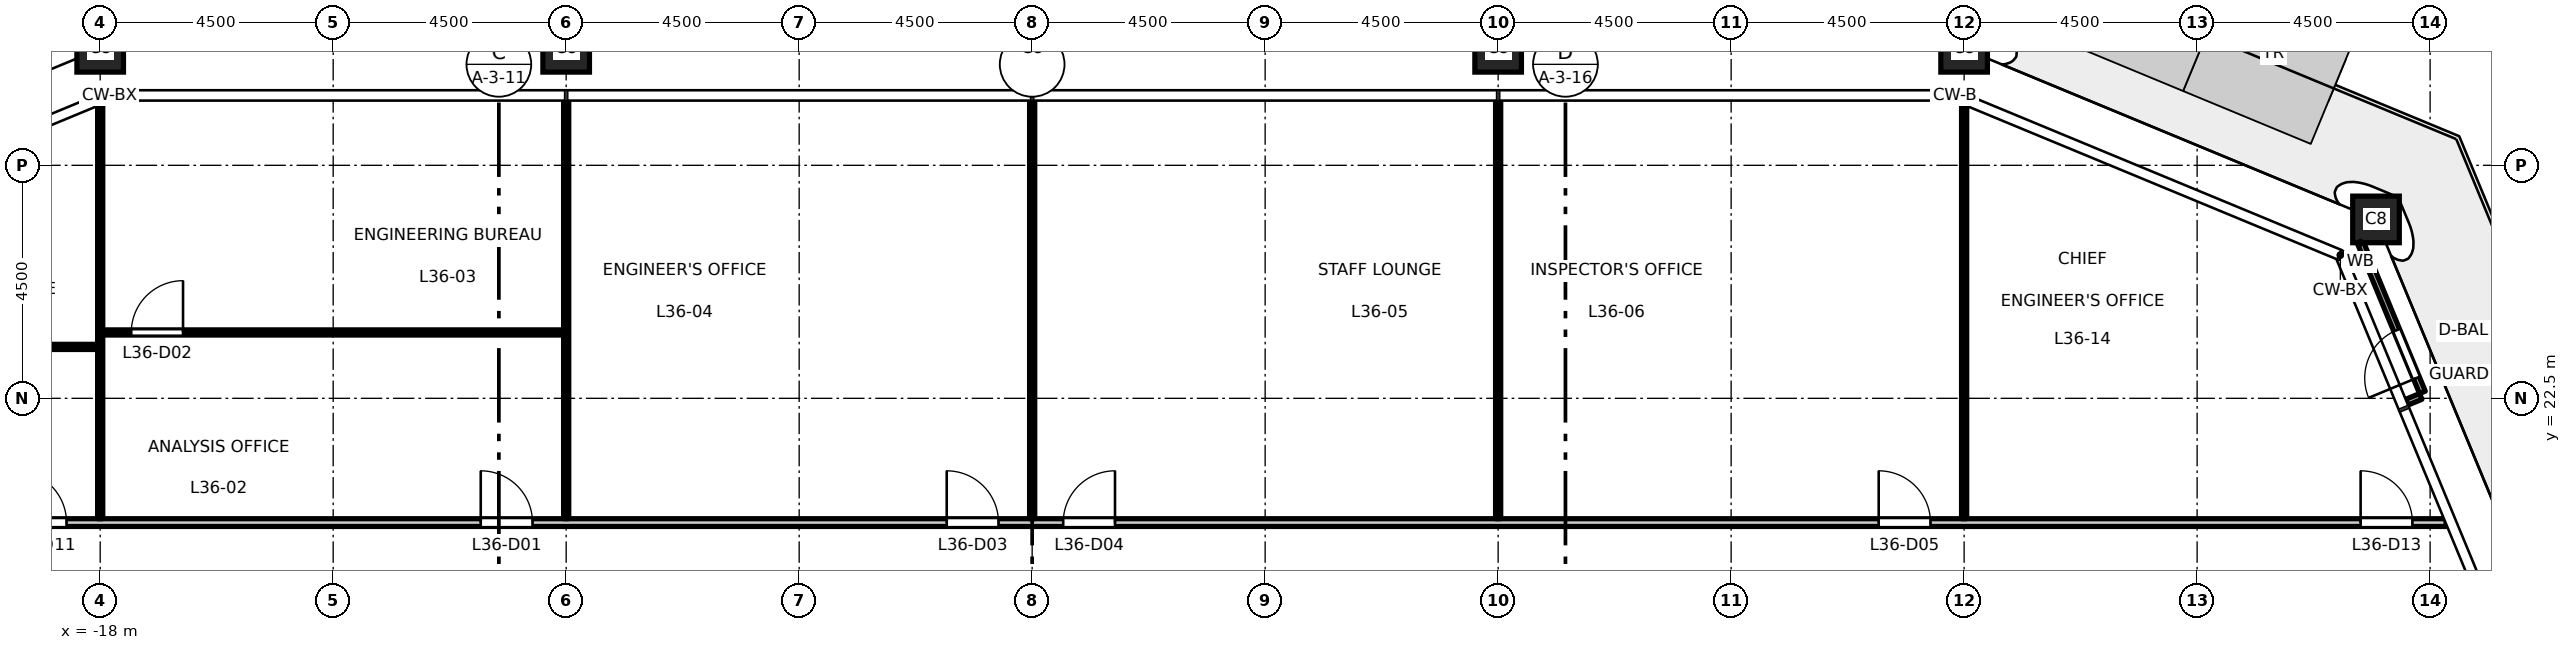
"""IFC4 building model, lengths in metres.
Left out: names, types, materials, properties, quantities, classifications, styles, units other than length and angle.
Written with IfcOpenShell. Run it as: python <this file> out.ifc"""

import sys

from ifc_helpers import new_model, si_unit, direction, frame, frame_2d, origin, origin_2d, place, context, subcontext, project, spatial, rectangle, hollow_rectangle, extrude, element, fill, save


model = new_model("IFC4")
c1 = context("Model", 3, precision=1e-05, world=origin(), true_north=direction((0.0, 1.0)))
c2 = subcontext(c1, "Body", "Model", "MODEL_VIEW")
j1 = project(units=[si_unit("LENGTHUNIT", "METRE"), si_unit("PLANEANGLEUNIT", "RADIAN")], contexts=[c1])
p1 = place(None, origin())
s1 = spatial("IfcSite", under=j1, at=p1, CompositionType="ELEMENT")
p2 = place(p1, origin())
s2 = spatial("IfcBuilding", under=s1, at=p2, CompositionType="ELEMENT")
p3 = place(p2, frame((0.0, 0.0, 167.7)))
s3 = spatial("IfcBuildingStorey", under=s2, at=p3, CompositionType="ELEMENT", Elevation=167.7)
for number, where, z_axis, x_axis in (
    (1, (25.955, 25.955, 0.0), (0.0, 0.0, 1.0), (1.0, 0.0, 0.0)),
    (2, (18.0, 29.25, 0.0), (0.0, 0.0, 1.0), (1.0, 0.0, 0.0)),
    (3, (9.0, 29.25, 0.0), (0.0, 0.0, 1.0), (1.0, 0.0, 0.0)),
    (4, (0.0, 29.25, 0.0), (0.0, 0.0, 1.0), (1.0, 0.0, 0.0)),
    (5, (-9.0, 29.25, 0.0), (0.0, 0.0, 1.0), (1.0, 0.0, 0.0)),
    (6, (-18.0, 29.25, 0.0), (0.0, 0.0, 1.0), (1.0, 0.0, 0.0)),
):
    element("IfcColumn", number, at=place(p3, frame(where, z_axis=z_axis, x_axis=x_axis)), inside=s3, PredefinedType="COLUMN", context=c2, shape_type="SweptSolid", body=[
        extrude(hollow_rectangle(XDim=0.9, YDim=0.9, WallThickness=0.05, at=origin_2d()), origin(), (0.0, 0.0, 1.0), 4.5),
    ])
for number, where, z_axis, x_axis in (
    (7, (26.551, 22.425, 0.0), (0.0, 0.0, 1.0), (0.924, 0.382, 0.0)),
    (8, (25.421, 25.153, 0.0), (0.0, 0.0, 1.0), (0.924, 0.383, 0.0)),
):
    element("IfcWall", number, at=place(p3, frame(where, z_axis=z_axis, x_axis=x_axis)), inside=s3, PredefinedType="STANDARD", context=c2, shape_type="SweptSolid", body=[
        extrude(rectangle(XDim=0.29, YDim=0.12, at=frame_2d((0.145, 0.0))), origin(), (0.0, 0.0, 1.0), 4.35),
    ])
p4 = place(p3, frame((26.852, 22.615, 0.0), z_axis=(0.0, 0.0, 1.0), x_axis=(-0.382691800707, 0.923876066186, 0.0)))
e9 = element("IfcWall", 9, at=p4, inside=s3, PredefinedType="STANDARD", context=c2, shape_type="SweptSolid", body=[
    extrude(rectangle(XDim=3.128, YDim=0.12, at=frame_2d((1.564, 0.0))), origin(), (0.0, 0.0, 1.0), 4.35),
])
p5 = place(p4, frame((0.3, 0.0, 0.0)))
e10 = element("IfcOpeningElement", 10, at=p5, cuts=e9, PredefinedType="OPENING", context=c2, shape_type="SweptSolid", body=[
    extrude(rectangle(XDim=1.0, YDim=2.4, at=frame_2d((0.5, 1.2))), frame((0.0, 0.07, 0.0), z_axis=(0.0, -1.0, 0.0), x_axis=(1.0, 0.0, 0.0)), (0.0, 0.0, 1.0), 0.14),
])
p6 = place(p3, frame((-27.308, 20.1, 0.0), z_axis=(0.0, 0.0, 1.0), x_axis=(1.0, 0.0, 0.0)))
e11 = element("IfcWall", 11, at=p6, inside=s3, PredefinedType="PARTITIONING", context=c2, shape_type="SweptSolid", body=[
    extrude(rectangle(XDim=54.616, YDim=0.15, at=frame_2d((27.308, 0.0))), origin(), (0.0, 0.0, 1.0), 4.35),
])
p7 = place(p6, frame((16.658, 0.0, 0.0)))
e12 = element("IfcOpeningElement", 12, at=p7, cuts=e11, PredefinedType="OPENING", context=c2, shape_type="SweptSolid", body=[
    extrude(rectangle(XDim=1.0, YDim=2.1, at=frame_2d((0.5, 1.05))), frame((0.0, 0.085, 0.0), z_axis=(0.0, -1.0, 0.0), x_axis=(1.0, 0.0, 0.0)), (0.0, 0.0, 1.0), 0.17),
])
p8 = place(p6, frame((25.658, 0.0, 0.0)))
e13 = element("IfcOpeningElement", 13, at=p8, cuts=e11, PredefinedType="OPENING", context=c2, shape_type="SweptSolid", body=[
    extrude(rectangle(XDim=1.0, YDim=2.1, at=frame_2d((0.5, 1.05))), frame((0.0, 0.085, 0.0), z_axis=(0.0, -1.0, 0.0), x_axis=(1.0, 0.0, 0.0)), (0.0, 0.0, 1.0), 0.17),
])
p9 = place(p6, frame((27.908, 0.0, 0.0)))
e14 = element("IfcOpeningElement", 14, at=p9, cuts=e11, PredefinedType="OPENING", context=c2, shape_type="SweptSolid", body=[
    extrude(rectangle(XDim=1.0, YDim=2.1, at=frame_2d((0.5, 1.05))), frame((0.0, 0.085, 0.0), z_axis=(0.0, -1.0, 0.0), x_axis=(1.0, 0.0, 0.0)), (0.0, 0.0, 1.0), 0.17),
])
p10 = place(p6, frame((43.658, 0.0, 0.0)))
e15 = element("IfcOpeningElement", 15, at=p10, cuts=e11, PredefinedType="OPENING", context=c2, shape_type="SweptSolid", body=[
    extrude(rectangle(XDim=1.0, YDim=2.1, at=frame_2d((0.5, 1.05))), frame((0.0, 0.085, 0.0), z_axis=(0.0, -1.0, 0.0), x_axis=(1.0, 0.0, 0.0)), (0.0, 0.0, 1.0), 0.17),
])
p11 = place(p6, frame((7.658, 0.0, 0.0)))
e16 = element("IfcOpeningElement", 16, at=p11, cuts=e11, PredefinedType="OPENING", context=c2, shape_type="SweptSolid", body=[
    extrude(rectangle(XDim=1.0, YDim=2.1, at=frame_2d((0.5, 1.05))), frame((0.0, 0.085, 0.0), z_axis=(0.0, -1.0, 0.0), x_axis=(1.0, 0.0, 0.0)), (0.0, 0.0, 1.0), 0.17),
])
p12 = place(p6, frame((52.966, 0.0, 0.0)))
e17 = element("IfcOpeningElement", 17, at=p12, cuts=e11, PredefinedType="OPENING", context=c2, shape_type="SweptSolid", body=[
    extrude(rectangle(XDim=1.0, YDim=2.1, at=frame_2d((0.5, 1.05))), frame((0.0, 0.085, 0.0), z_axis=(0.0, -1.0, 0.0), x_axis=(1.0, 0.0, 0.0)), (0.0, 0.0, 1.0), 0.17),
])
p13 = place(p3, frame((-25.903, 23.493, 0.0), z_axis=(0.0, 0.0, 1.0), x_axis=(1.0, 0.0, 0.0)))
e18 = element("IfcWall", 18, at=p13, inside=s3, PredefinedType="PARTITIONING", context=c2, shape_type="SweptSolid", body=[
    extrude(rectangle(XDim=7.853, YDim=0.1, at=frame_2d((3.927, 0.0))), origin(), (0.0, 0.0, 1.0), 4.35),
])
p14 = place(p13, frame((0.753, 0.0, 0.0)))
e19 = element("IfcOpeningElement", 19, at=p14, cuts=e18, PredefinedType="OPENING", context=c2, shape_type="SweptSolid", body=[
    extrude(rectangle(XDim=1.0, YDim=2.1, at=frame_2d((0.5, 1.05))), frame((0.0, 0.06, 0.0), z_axis=(0.0, -1.0, 0.0), x_axis=(1.0, 0.0, 0.0)), (0.0, 0.0, 1.0), 0.12),
])
p15 = place(p3, frame((-17.95, 23.772, 0.0), z_axis=(0.0, 0.0, 1.0), x_axis=(1.0, 0.0, 0.0)))
e20 = element("IfcWall", 20, at=p15, inside=s3, PredefinedType="PARTITIONING", context=c2, shape_type="SweptSolid", body=[
    extrude(rectangle(XDim=8.9, YDim=0.1, at=frame_2d((4.45, 0.0))), origin(), (0.0, 0.0, 1.0), 4.35),
])
p16 = place(p15, frame((0.55, 0.0, 0.0)))
e21 = element("IfcOpeningElement", 21, at=p16, cuts=e20, PredefinedType="OPENING", context=c2, shape_type="SweptSolid", body=[
    extrude(rectangle(XDim=1.0, YDim=2.1, at=frame_2d((0.5, 1.05))), frame((0.0, 0.06, 0.0), z_axis=(0.0, -1.0, 0.0), x_axis=(1.0, 0.0, 0.0)), (0.0, 0.0, 1.0), 0.12),
])
p17 = place(p3, frame((-18.0, 20.175, 0.0), z_axis=(0.0, 0.0, 1.0), x_axis=(0.0, 1.0, 0.0)))
e22 = element("IfcWall", 22, at=p17, inside=s3, PredefinedType="PARTITIONING", context=c2, shape_type="SweptSolid", body=[
    extrude(rectangle(XDim=8.003, YDim=0.1, at=frame_2d((4.001, 0.0))), origin(), (0.0, 0.0, 1.0), 3.45),
])
for number, where, z_axis, x_axis in (
    (23, (-9.0, 20.175, 0.0), (0.0, 0.0, 1.0), (0.0, 1.0, 0.0)),
    (24, (0.0, 20.175, 0.0), (0.0, 0.0, 1.0), (0.0, 1.0, 0.0)),
    (25, (9.0, 20.175, 0.0), (0.0, 0.0, 1.0), (0.0, 1.0, 0.0)),
):
    element("IfcWall", number, at=place(p3, frame(where, z_axis=z_axis, x_axis=x_axis)), inside=s3, PredefinedType="PARTITIONING", context=c2, shape_type="SweptSolid", body=[
        extrude(rectangle(XDim=8.085, YDim=0.1, at=frame_2d((4.042, 0.0))), origin(), (0.0, 0.0, 1.0), 3.45),
    ])
p18 = place(p3, frame((18.0, 20.175, 0.0), z_axis=(0.0, 0.0, 1.0), x_axis=(0.0, 1.0, 0.0)))
e26 = element("IfcWall", 26, at=p18, inside=s3, PredefinedType="PARTITIONING", context=c2, shape_type="SweptSolid", body=[
    extrude(rectangle(XDim=8.003, YDim=0.1, at=frame_2d((4.001, 0.0))), origin(), (0.0, 0.0, 1.0), 3.45),
])
p19 = place(p5, origin())
e27 = element("IfcDoor", 27, at=p19, inside=s3, OperationType="SINGLE_SWING_LEFT", PredefinedType="DOOR", context=c2, shape_type="SweptSolid", body=[
    extrude(rectangle(XDim=1.0, YDim=2.4, at=frame_2d((0.5, 1.2))), frame((0.0, 0.025, 0.0), z_axis=(0.0, -1.0, 0.0), x_axis=(1.0, 0.0, 0.0)), (0.0, 0.0, 1.0), 0.05),
])
fill(e10, e27)
p20 = place(p7, origin())
e28 = element("IfcDoor", 28, at=p20, inside=s3, OperationType="SINGLE_SWING_LEFT", PredefinedType="DOOR", context=c2, shape_type="SweptSolid", body=[
    extrude(rectangle(XDim=1.0, YDim=2.1, at=frame_2d((0.5, 1.05))), frame((0.0, 0.025, 0.0), z_axis=(0.0, -1.0, 0.0), x_axis=(1.0, 0.0, 0.0)), (0.0, 0.0, 1.0), 0.05),
])
fill(e12, e28)
p21 = place(p16, origin())
e29 = element("IfcDoor", 29, at=p21, inside=s3, OperationType="SINGLE_SWING_RIGHT", PredefinedType="DOOR", context=c2, shape_type="SweptSolid", body=[
    extrude(rectangle(XDim=1.0, YDim=2.1, at=frame_2d((0.5, 1.05))), frame((0.0, 0.025, 0.0), z_axis=(0.0, -1.0, 0.0), x_axis=(1.0, 0.0, 0.0)), (0.0, 0.0, 1.0), 0.05),
])
fill(e21, e29)
p22 = place(p8, origin())
e30 = element("IfcDoor", 30, at=p22, inside=s3, OperationType="SINGLE_SWING_LEFT", PredefinedType="DOOR", context=c2, shape_type="SweptSolid", body=[
    extrude(rectangle(XDim=1.0, YDim=2.1, at=frame_2d((0.5, 1.05))), frame((0.0, 0.025, 0.0), z_axis=(0.0, -1.0, 0.0), x_axis=(1.0, 0.0, 0.0)), (0.0, 0.0, 1.0), 0.05),
])
fill(e13, e30)
p23 = place(p9, origin())
e31 = element("IfcDoor", 31, at=p23, inside=s3, OperationType="SINGLE_SWING_RIGHT", PredefinedType="DOOR", context=c2, shape_type="SweptSolid", body=[
    extrude(rectangle(XDim=1.0, YDim=2.1, at=frame_2d((0.5, 1.05))), frame((0.0, 0.025, 0.0), z_axis=(0.0, -1.0, 0.0), x_axis=(1.0, 0.0, 0.0)), (0.0, 0.0, 1.0), 0.05),
])
fill(e14, e31)
p24 = place(p10, origin())
e32 = element("IfcDoor", 32, at=p24, inside=s3, OperationType="SINGLE_SWING_LEFT", PredefinedType="DOOR", context=c2, shape_type="SweptSolid", body=[
    extrude(rectangle(XDim=1.0, YDim=2.1, at=frame_2d((0.5, 1.05))), frame((0.0, 0.025, 0.0), z_axis=(0.0, -1.0, 0.0), x_axis=(1.0, 0.0, 0.0)), (0.0, 0.0, 1.0), 0.05),
])
fill(e15, e32)
p25 = place(p11, origin())
e33 = element("IfcDoor", 33, at=p25, inside=s3, OperationType="SINGLE_SWING_LEFT", PredefinedType="DOOR", context=c2, shape_type="SweptSolid", body=[
    extrude(rectangle(XDim=1.0, YDim=2.1, at=frame_2d((0.5, 1.05))), frame((0.0, 0.025, 0.0), z_axis=(0.0, -1.0, 0.0), x_axis=(1.0, 0.0, 0.0)), (0.0, 0.0, 1.0), 0.05),
])
fill(e16, e33)
p26 = place(p12, origin())
e34 = element("IfcDoor", 34, at=p26, inside=s3, OperationType="SINGLE_SWING_LEFT", PredefinedType="DOOR", context=c2, shape_type="SweptSolid", body=[
    extrude(rectangle(XDim=1.0, YDim=2.1, at=frame_2d((0.5, 1.05))), frame((0.0, 0.025, 0.0), z_axis=(0.0, -1.0, 0.0), x_axis=(1.0, 0.0, 0.0)), (0.0, 0.0, 1.0), 0.05),
])
fill(e17, e34)
save(model, sys.argv[1])
